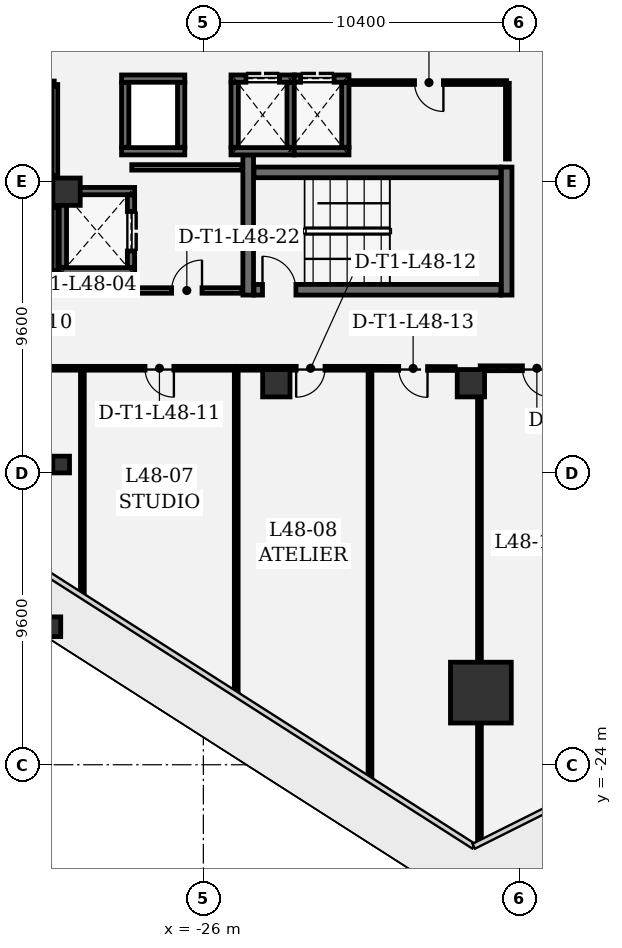
"""IFC4 building model, lengths in metres.
Left out: names, types, materials, properties, quantities, classifications, styles, units other than length and angle.
Written with IfcOpenShell. Run it as: python <this file> out.ifc"""

import sys

from ifc_helpers import new_model, si_unit, direction, frame, frame_2d, origin, origin_2d, place, context, subcontext, project, spatial, rectangle, extrude, element, fill, save


model = new_model("IFC4")
c1 = context("Model", 3, precision=1e-05, world=origin(), true_north=direction((0.0, 1.0)))
c2 = subcontext(c1, "Body", "Model", "MODEL_VIEW")
j1 = project(units=[si_unit("LENGTHUNIT", "METRE"), si_unit("PLANEANGLEUNIT", "RADIAN")], contexts=[c1])
p1 = place(None, origin())
s1 = spatial("IfcSite", under=j1, at=p1, CompositionType="ELEMENT")
p2 = place(p1, origin())
s2 = spatial("IfcBuilding", under=s1, at=p2, CompositionType="ELEMENT")
p3 = place(p2, frame((0.0, 0.0, 209.1)))
s3 = spatial("IfcBuildingStorey", under=s2, at=p3, CompositionType="ELEMENT", Elevation=209.1)
p4 = place(p3, frame((-16.872, -21.627, 0.0), z_axis=(0.0, 0.0, 1.0), x_axis=(1.0, 0.0, 0.0)))
e1 = element("IfcColumn", 1, at=p4, inside=s3, PredefinedType="COLUMN", context=c2, shape_type="SweptSolid", body=[
    extrude(rectangle(XDim=2.0, YDim=2.0, at=origin_2d()), origin(), (0.0, 0.0, 1.0), 4.05),
])
for number, where, z_axis, x_axis in (
    (2, (-17.2, -11.45, 0.0), (0.0, 0.0, 1.0), (1.0, 0.0, 0.0)),
    (3, (-23.6, -11.45, 0.0), (0.0, 0.0, 1.0), (1.0, 0.0, 0.0)),
    (4, (-30.5, -5.15, 0.0), (0.0, 0.0, 1.0), (1.0, 0.0, 0.0)),
):
    element("IfcColumn", number, at=place(p3, frame(where, z_axis=z_axis, x_axis=x_axis)), inside=s3, PredefinedType="COLUMN", context=c2, shape_type="SweptSolid", body=[
        extrude(rectangle(XDim=0.9, YDim=0.9, at=origin_2d()), origin(), (0.0, 0.0, 1.0), 4.05),
    ])
p5 = place(p3, frame((-31.016, -19.46, 0.0), z_axis=(0.0, 0.0, 1.0), x_axis=(1.0, 0.0, 0.0)))
e5 = element("IfcColumn", 5, at=p5, inside=s3, PredefinedType="COLUMN", context=c2, shape_type="SweptSolid", body=[
    extrude(rectangle(XDim=0.65, YDim=0.65, at=origin_2d()), origin(), (0.0, 0.0, 1.0), 4.05),
])
p6 = place(p3, frame((-30.677, -14.124, 0.0), z_axis=(0.0, 0.0, 1.0), x_axis=(1.0, 0.0, 0.0)))
e6 = element("IfcColumn", 6, at=p6, inside=s3, PredefinedType="COLUMN", context=c2, shape_type="SweptSolid", body=[
    extrude(rectangle(XDim=0.55, YDim=0.55, at=origin_2d()), origin(), (0.0, 0.0, 1.0), 4.05),
])
p7 = place(p3, frame((-24.525, -3.94, 0.0), z_axis=(0.0, 0.0, 1.0), x_axis=(0.0, -1.0, 0.0)))
e7 = element("IfcWall", 7, at=p7, inside=s3, PredefinedType="SHEAR", context=c2, shape_type="SweptSolid", body=[
    extrude(rectangle(XDim=4.61, YDim=0.35, at=frame_2d((2.305, 0.0))), origin(), (0.0, 0.0, 1.0), 3.78),
])
p8 = place(p3, frame((-16.025, -8.55, 0.0), z_axis=(0.0, 0.0, 1.0), x_axis=(0.0, 1.0, 0.0)))
e8 = element("IfcWall", 8, at=p8, inside=s3, PredefinedType="SHEAR", context=c2, shape_type="SweptSolid", body=[
    extrude(rectangle(XDim=4.21, YDim=0.35, at=frame_2d((2.105, 0.0))), origin(), (0.0, 0.0, 1.0), 3.78),
])
p9 = place(p3, frame((-24.335, -8.375, 0.0), z_axis=(0.0, 0.0, 1.0), x_axis=(1.0, 0.0, 0.0)))
e9 = element("IfcWall", 9, at=p9, inside=s3, PredefinedType="SHEAR", context=c2, shape_type="SweptSolid", body=[
    extrude(rectangle(XDim=8.12, YDim=0.35, at=frame_2d((4.06, 0.0))), origin(), (0.0, 0.0, 1.0), 3.78),
])
p10 = place(p9, frame((0.28, 0.0, 0.0)))
e10 = element("IfcOpeningElement", 10, at=p10, cuts=e9, PredefinedType="OPENING", context=c2, shape_type="SweptSolid", body=[
    extrude(rectangle(XDim=1.1, YDim=2.2, at=frame_2d((0.55, 1.1))), frame((0.0, 0.185, 0.0), z_axis=(0.0, -1.0, 0.0), x_axis=(1.0, 0.0, 0.0)), (0.0, 0.0, 1.0), 0.37),
])
p11 = place(p3, frame((-16.215, -4.515, 0.0), z_axis=(0.0, 0.0, 1.0), x_axis=(-1.0, 0.0, 0.0)))
e11 = element("IfcWall", 11, at=p11, inside=s3, PredefinedType="SHEAR", context=c2, shape_type="SweptSolid", body=[
    extrude(rectangle(XDim=8.12, YDim=0.35, at=frame_2d((4.06, 0.0))), origin(), (0.0, 0.0, 1.0), 3.78),
])
for number, where, z_axis, x_axis in (
    (12, (-28.26, -7.77, 0.0), (0.0, 0.0, 1.0), (-1.0, 0.0, 0.0)),
    (13, (-30.74, -5.13, 0.0), (0.0, 0.0, 1.0), (1.0, 0.0, 0.0)),
):
    element("IfcWall", number, at=place(p3, frame(where, z_axis=z_axis, x_axis=x_axis)), inside=s3, PredefinedType="SHEAR", context=c2, shape_type="SweptSolid", body=[
        extrude(rectangle(XDim=2.48, YDim=0.24, at=frame_2d((1.24, 0.0))), origin(), (0.0, 0.0, 1.0), 3.78),
    ])
p12 = place(p3, frame((-30.62, -7.638, 0.0), z_axis=(0.0, 0.0, 1.0), x_axis=(0.0, 1.0, 0.0)))
e14 = element("IfcWall", 14, at=p12, inside=s3, PredefinedType="SHEAR", context=c2, shape_type="SweptSolid", body=[
    extrude(rectangle(XDim=2.376, YDim=0.24, at=frame_2d((1.188, 0.0))), origin(), (0.0, 0.0, 1.0), 3.78),
])
p13 = place(p3, frame((-28.38, -5.262, 0.0), z_axis=(0.0, 0.0, 1.0), x_axis=(0.0, -1.0, 0.0)))
e15 = element("IfcWall", 15, at=p13, inside=s3, PredefinedType="SHEAR", context=c2, shape_type="SweptSolid", body=[
    extrude(rectangle(XDim=2.376, YDim=0.24, at=frame_2d((1.188, 0.0))), origin(), (0.0, 0.0, 1.0), 3.78),
])
p14 = place(p13, frame((0.538, 0.0, 0.0)))
e16 = element("IfcOpeningElement", 16, at=p14, cuts=e15, PredefinedType="OPENING", context=c2, shape_type="SweptSolid", body=[
    extrude(rectangle(XDim=1.3, YDim=2.3, at=frame_2d((0.65, 1.15))), frame((0.0, 0.13, 0.0), z_axis=(0.0, -1.0, 0.0), x_axis=(1.0, 0.0, 0.0)), (0.0, 0.0, 1.0), 0.26),
])
for number, where, z_axis, x_axis in (
    (17, (-26.61, -3.82, 0.0), (0.0, 0.0, 1.0), (-1.0, 0.0, 0.0)),
    (18, (-28.69, -1.43, 0.0), (0.0, 0.0, 1.0), (1.0, 0.0, 0.0)),
):
    element("IfcWall", number, at=place(p3, frame(where, z_axis=z_axis, x_axis=x_axis)), inside=s3, PredefinedType="SHEAR", context=c2, shape_type="SweptSolid", body=[
        extrude(rectangle(XDim=2.08, YDim=0.24, at=frame_2d((1.04, 0.0))), origin(), (0.0, 0.0, 1.0), 3.78),
    ])
for number, where, z_axis, x_axis in (
    (19, (-28.57, -3.688, 0.0), (0.0, 0.0, 1.0), (0.0, 1.0, 0.0)),
    (20, (-26.73, -1.562, 0.0), (0.0, 0.0, 1.0), (0.0, -1.0, 0.0)),
):
    element("IfcWall", number, at=place(p3, frame(where, z_axis=z_axis, x_axis=x_axis)), inside=s3, PredefinedType="SHEAR", context=c2, shape_type="SweptSolid", body=[
        extrude(rectangle(XDim=2.126, YDim=0.24, at=frame_2d((1.063, 0.0))), origin(), (0.0, 0.0, 1.0), 3.78),
    ])
p15 = place(p3, frame((-23.01, -3.82, 0.0), z_axis=(0.0, 0.0, 1.0), x_axis=(-1.0, 0.0, 0.0)))
e21 = element("IfcWall", 21, at=p15, inside=s3, PredefinedType="SHEAR", context=c2, shape_type="SweptSolid", body=[
    extrude(rectangle(XDim=2.08, YDim=0.24, at=frame_2d((1.04, 0.0))), origin(), (0.0, 0.0, 1.0), 3.78),
])
p16 = place(p3, frame((-25.09, -1.43, 0.0), z_axis=(0.0, 0.0, 1.0), x_axis=(1.0, 0.0, 0.0)))
e22 = element("IfcWall", 22, at=p16, inside=s3, PredefinedType="SHEAR", context=c2, shape_type="SweptSolid", body=[
    extrude(rectangle(XDim=2.08, YDim=0.24, at=frame_2d((1.04, 0.0))), origin(), (0.0, 0.0, 1.0), 3.78),
])
p17 = place(p16, frame((0.49, 0.0, 0.0)))
e23 = element("IfcOpeningElement", 23, at=p17, cuts=e22, PredefinedType="OPENING", context=c2, shape_type="SweptSolid", body=[
    extrude(rectangle(XDim=1.1, YDim=2.2, at=frame_2d((0.55, 1.1))), frame((0.0, 0.13, 0.0), z_axis=(0.0, -1.0, 0.0), x_axis=(1.0, 0.0, 0.0)), (0.0, 0.0, 1.0), 0.26),
])
for number, where, z_axis, x_axis in (
    (24, (-24.97, -3.688, 0.0), (0.0, 0.0, 1.0), (0.0, 1.0, 0.0)),
    (25, (-23.13, -1.562, 0.0), (0.0, 0.0, 1.0), (0.0, -1.0, 0.0)),
):
    element("IfcWall", number, at=place(p3, frame(where, z_axis=z_axis, x_axis=x_axis)), inside=s3, PredefinedType="SHEAR", context=c2, shape_type="SweptSolid", body=[
        extrude(rectangle(XDim=2.126, YDim=0.24, at=frame_2d((1.063, 0.0))), origin(), (0.0, 0.0, 1.0), 3.78),
    ])
p18 = place(p3, frame((-21.21, -3.82, 0.0), z_axis=(0.0, 0.0, 1.0), x_axis=(-1.0, 0.0, 0.0)))
e26 = element("IfcWall", 26, at=p18, inside=s3, PredefinedType="SHEAR", context=c2, shape_type="SweptSolid", body=[
    extrude(rectangle(XDim=1.8, YDim=0.24, at=frame_2d((0.9, 0.0))), origin(), (0.0, 0.0, 1.0), 3.78),
])
p19 = place(p3, frame((-23.01, -1.43, 0.0), z_axis=(0.0, 0.0, 1.0), x_axis=(1.0, 0.0, 0.0)))
e27 = element("IfcWall", 27, at=p19, inside=s3, PredefinedType="SHEAR", context=c2, shape_type="SweptSolid", body=[
    extrude(rectangle(XDim=1.8, YDim=0.24, at=frame_2d((0.9, 0.0))), origin(), (0.0, 0.0, 1.0), 3.78),
])
p20 = place(p19, frame((0.21, 0.0, 0.0)))
e28 = element("IfcOpeningElement", 28, at=p20, cuts=e27, PredefinedType="OPENING", context=c2, shape_type="SweptSolid", body=[
    extrude(rectangle(XDim=1.1, YDim=2.2, at=frame_2d((0.55, 1.1))), frame((0.0, 0.13, 0.0), z_axis=(0.0, -1.0, 0.0), x_axis=(1.0, 0.0, 0.0)), (0.0, 0.0, 1.0), 0.26),
])
p21 = place(p3, frame((-21.33, -1.562, 0.0), z_axis=(0.0, 0.0, 1.0), x_axis=(0.0, -1.0, 0.0)))
e29 = element("IfcWall", 29, at=p21, inside=s3, PredefinedType="SHEAR", context=c2, shape_type="SweptSolid", body=[
    extrude(rectangle(XDim=2.126, YDim=0.24, at=frame_2d((1.063, 0.0))), origin(), (0.0, 0.0, 1.0), 3.78),
])
p22 = place(p3, frame((-28.355, -8.4, 0.0), z_axis=(0.0, 0.0, 1.0), x_axis=(1.0, 0.0, 0.0)))
e30 = element("IfcWall", 30, at=p22, inside=s3, PredefinedType="PARTITIONING", context=c2, shape_type="SweptSolid", body=[
    extrude(rectangle(XDim=3.622, YDim=0.18, at=frame_2d((1.811, 0.0))), origin(), (0.0, 0.0, 1.0), 3.78),
])
p23 = place(p22, frame((1.311, 0.0, 0.0)))
e31 = element("IfcOpeningElement", 31, at=p23, cuts=e30, PredefinedType="OPENING", context=c2, shape_type="SweptSolid", body=[
    extrude(rectangle(XDim=1.0, YDim=2.15, at=frame_2d((0.5, 1.075))), frame((0.0, 0.1, 0.0), z_axis=(0.0, -1.0, 0.0), x_axis=(1.0, 0.0, 0.0)), (0.0, 0.0, 1.0), 0.2),
])
p24 = place(p3, frame((-24.733, -4.35, 0.0), z_axis=(0.0, 0.0, 1.0), x_axis=(-1.0, 0.0, 0.0)))
e32 = element("IfcWall", 32, at=p24, inside=s3, PredefinedType="PARTITIONING", context=c2, shape_type="SweptSolid", body=[
    extrude(rectangle(XDim=3.622, YDim=0.18, at=frame_2d((1.811, 0.0))), origin(), (0.0, 0.0, 1.0), 3.78),
])
p25 = place(p3, frame((-16.0, -4.075, 0.0), z_axis=(0.0, 0.0, 1.0), x_axis=(0.0, 1.0, 0.0)))
e33 = element("IfcWall", 33, at=p25, inside=s3, PredefinedType="PARTITIONING", context=c2, shape_type="SweptSolid", body=[
    extrude(rectangle(XDim=2.49, YDim=0.125, at=frame_2d((1.245, 0.0))), origin(), (0.0, 0.0, 1.0), 3.78),
])
p26 = place(p3, frame((-16.025, -1.56, 0.0), z_axis=(0.0, 0.0, 1.0), x_axis=(-1.0, 0.0, 0.0)))
e34 = element("IfcWall", 34, at=p26, inside=s3, PredefinedType="PARTITIONING", context=c2, shape_type="SweptSolid", body=[
    extrude(rectangle(XDim=5.109, YDim=0.125, at=frame_2d((2.554, 0.0))), origin(), (0.0, 0.0, 1.0), 3.78),
])
p27 = place(p26, frame((2.079, 0.0, 0.0)))
e35 = element("IfcOpeningElement", 35, at=p27, cuts=e34, PredefinedType="OPENING", context=c2, shape_type="SweptSolid", body=[
    extrude(rectangle(XDim=0.95, YDim=2.15, at=frame_2d((0.475, 1.075))), frame((0.0, 0.073, 0.0), z_axis=(0.0, -1.0, 0.0), x_axis=(1.0, 0.0, 0.0)), (0.0, 0.0, 1.0), 0.145),
])
p28 = place(p3, frame((-34.155, -8.35, 0.0), z_axis=(0.0, 0.0, 1.0), x_axis=(1.0, 0.0, 0.0)))
e36 = element("IfcWall", 36, at=p28, inside=s3, PredefinedType="PARTITIONING", context=c2, shape_type="SweptSolid", body=[
    extrude(rectangle(XDim=3.25, YDim=0.18, at=frame_2d((1.625, 0.0))), origin(), (0.0, 0.0, 1.0), 3.344),
])
p29 = place(p3, frame((-30.88, -7.743, 0.0), z_axis=(0.0, 0.0, 1.0), x_axis=(0.0, 1.0, 0.0)))
e37 = element("IfcWall", 37, at=p29, inside=s3, PredefinedType="PARTITIONING", context=c2, shape_type="SweptSolid", body=[
    extrude(rectangle(XDim=2.078, YDim=0.18, at=frame_2d((1.039, 0.0))), origin(), (0.0, 0.0, 1.0), 3.78),
])
p30 = place(p3, frame((-30.88, -4.635, 0.0), z_axis=(0.0, 0.0, 1.0), x_axis=(0.0, 1.0, 0.0)))
e38 = element("IfcWall", 38, at=p30, inside=s3, PredefinedType="PARTITIONING", context=c2, shape_type="SweptSolid", body=[
    extrude(rectangle(XDim=3.01, YDim=0.18, at=frame_2d((1.505, 0.0))), origin(), (0.0, 0.0, 1.0), 3.78),
])
p31 = place(p3, frame((-30.905, -1.6, 0.0), z_axis=(0.0, 0.0, 1.0), x_axis=(-1.0, 0.0, 0.0)))
e39 = element("IfcWall", 39, at=p31, inside=s3, PredefinedType="PARTITIONING", context=c2, shape_type="SweptSolid", body=[
    extrude(rectangle(XDim=3.25, YDim=0.18, at=frame_2d((1.625, 0.0))), origin(), (0.0, 0.0, 1.0), 3.78),
])
p32 = place(p3, frame((-30.004, -10.958, 0.0), z_axis=(0.0, 0.0, 1.0), x_axis=(-1.0, 0.0, 0.0)))
e40 = element("IfcWall", 40, at=p32, inside=s3, PredefinedType="PARTITIONING", context=c2, shape_type="SweptSolid", body=[
    extrude(rectangle(XDim=4.621, YDim=0.125, at=frame_2d((2.311, 0.0))), origin(), (0.0, 0.0, 1.0), 2.9),
])
p33 = place(p32, frame((1.835, 0.0, 0.0)))
e41 = element("IfcOpeningElement", 41, at=p33, cuts=e40, PredefinedType="OPENING", context=c2, shape_type="SweptSolid", body=[
    extrude(rectangle(XDim=0.95, YDim=2.15, at=frame_2d((0.475, 1.075))), frame((0.0, 0.073, 0.0), z_axis=(0.0, -1.0, 0.0), x_axis=(1.0, 0.0, 0.0)), (0.0, 0.0, 1.0), 0.145),
])
p34 = place(p3, frame((-29.979, -18.373, 0.0), z_axis=(0.0, 0.0, 1.0), x_axis=(0.0, 1.0, 0.0)))
e42 = element("IfcWall", 42, at=p34, inside=s3, PredefinedType="PARTITIONING", context=c2, shape_type="SweptSolid", body=[
    extrude(rectangle(XDim=7.39, YDim=0.125, at=frame_2d((3.695, 0.0))), origin(), (0.0, 0.0, 1.0), 3.78),
])
p35 = place(p3, frame((-24.943, -10.958, 0.0), z_axis=(0.0, 0.0, 1.0), x_axis=(-1.0, 0.0, 0.0)))
e43 = element("IfcWall", 43, at=p35, inside=s3, PredefinedType="PARTITIONING", context=c2, shape_type="SweptSolid", body=[
    extrude(rectangle(XDim=5.003, YDim=0.125, at=frame_2d((2.501, 0.0))), origin(), (0.0, 0.0, 1.0), 3.78),
])
p36 = place(p35, frame((2.026, 0.0, 0.0)))
e44 = element("IfcOpeningElement", 44, at=p36, cuts=e43, PredefinedType="OPENING", context=c2, shape_type="SweptSolid", body=[
    extrude(rectangle(XDim=0.95, YDim=2.15, at=frame_2d((0.475, 1.075))), frame((0.0, 0.073, 0.0), z_axis=(0.0, -1.0, 0.0), x_axis=(1.0, 0.0, 0.0)), (0.0, 0.0, 1.0), 0.145),
])
p37 = place(p3, frame((-24.918, -21.607, 0.0), z_axis=(0.0, 0.0, 1.0), x_axis=(0.0, 1.0, 0.0)))
e45 = element("IfcWall", 45, at=p37, inside=s3, PredefinedType="PARTITIONING", context=c2, shape_type="SweptSolid", body=[
    extrude(rectangle(XDim=10.625, YDim=0.125, at=frame_2d((5.312, 0.0))), origin(), (0.0, 0.0, 1.0), 3.344),
])
p38 = place(p3, frame((-20.544, -10.958, 0.0), z_axis=(0.0, 0.0, 1.0), x_axis=(-1.0, 0.0, 0.0)))
e46 = element("IfcWall", 46, at=p38, inside=s3, PredefinedType="PARTITIONING", context=c2, shape_type="SweptSolid", body=[
    extrude(rectangle(XDim=4.341, YDim=0.125, at=frame_2d((2.17, 0.0))), origin(), (0.0, 0.0, 1.0), 3.78),
])
p39 = place(p38, frame((1.453, 0.0, 0.0)))
e47 = element("IfcOpeningElement", 47, at=p39, cuts=e46, PredefinedType="OPENING", context=c2, shape_type="SweptSolid", body=[
    extrude(rectangle(XDim=0.95, YDim=2.15, at=frame_2d((0.475, 1.075))), frame((0.0, 0.073, 0.0), z_axis=(0.0, -1.0, 0.0), x_axis=(1.0, 0.0, 0.0)), (0.0, 0.0, 1.0), 0.145),
])
p40 = place(p3, frame((-20.519, -24.419, 0.0), z_axis=(0.0, 0.0, 1.0), x_axis=(0.0, 1.0, 0.0)))
e48 = element("IfcWall", 48, at=p40, inside=s3, PredefinedType="PARTITIONING", context=c2, shape_type="SweptSolid", body=[
    extrude(rectangle(XDim=13.436, YDim=0.125, at=frame_2d((6.718, 0.0))), origin(), (0.0, 0.0, 1.0), 2.895),
])
p41 = place(p3, frame((-16.919, -26.506, 0.0), z_axis=(0.0, 0.0, 1.0), x_axis=(0.0, 1.0, 0.0)))
e49 = element("IfcWall", 49, at=p41, inside=s3, PredefinedType="PARTITIONING", context=c2, shape_type="SweptSolid", body=[
    extrude(rectangle(XDim=3.814, YDim=0.125, at=frame_2d((1.907, 0.0))), origin(), (0.0, 0.0, 1.0), 3.78),
])
p42 = place(p3, frame((-16.919, -20.562, 0.0), z_axis=(0.0, 0.0, 1.0), x_axis=(0.0, 1.0, 0.0)))
e50 = element("IfcWall", 50, at=p42, inside=s3, PredefinedType="PARTITIONING", context=c2, shape_type="SweptSolid", body=[
    extrude(rectangle(XDim=8.597, YDim=0.125, at=frame_2d((4.298, 0.0))), origin(), (0.0, 0.0, 1.0), 2.9),
])
p43 = place(p3, frame((-17.715, -10.967, 0.0), z_axis=(0.0, 0.0, 1.0), x_axis=(-0.999994395436, 0.003347998857, 0.0)))
e51 = element("IfcWall", 51, at=p43, inside=s3, PredefinedType="PARTITIONING", context=c2, shape_type="SweptSolid", body=[
    extrude(rectangle(XDim=2.771, YDim=0.125, at=frame_2d((1.385, 0.0))), origin(), (0.0, 0.0, 1.0), 3.344),
])
p44 = place(p43, frame((0.91, 0.0, 0.0)))
e52 = element("IfcOpeningElement", 52, at=p44, cuts=e51, PredefinedType="OPENING", context=c2, shape_type="SweptSolid", body=[
    extrude(rectangle(XDim=0.95, YDim=2.15, at=frame_2d((0.475, 1.075))), frame((0.0, 0.073, 0.0), z_axis=(0.0, -1.0, 0.0), x_axis=(1.0, 0.0, 0.0)), (0.0, 0.0, 1.0), 0.145),
])
p45 = place(p3, frame((-13.167, -10.958, 0.0), z_axis=(0.0, 0.0, 1.0), x_axis=(-1.0, 0.0, 0.0)))
e53 = element("IfcWall", 53, at=p45, inside=s3, PredefinedType="PARTITIONING", context=c2, shape_type="SweptSolid", body=[
    extrude(rectangle(XDim=3.727, YDim=0.16, at=frame_2d((1.863, 0.0))), origin(), (0.0, 0.0, 1.0), 3.344),
])
p46 = place(p45, frame((1.388, 0.0, 0.0)))
e54 = element("IfcOpeningElement", 54, at=p46, cuts=e53, PredefinedType="OPENING", context=c2, shape_type="SweptSolid", body=[
    extrude(rectangle(XDim=0.95, YDim=2.15, at=frame_2d((0.475, 1.075))), frame((0.0, 0.09, 0.0), z_axis=(0.0, -1.0, 0.0), x_axis=(1.0, 0.0, 0.0)), (0.0, 0.0, 1.0), 0.18),
])
p47 = place(p10, origin())
e55 = element("IfcDoor", 55, at=p47, inside=s3, OperationType="SINGLE_SWING_LEFT", PredefinedType="DOOR", context=c2, shape_type="SweptSolid", body=[
    extrude(rectangle(XDim=1.1, YDim=2.2, at=frame_2d((0.55, 1.1))), frame((0.0, 0.025, 0.0), z_axis=(0.0, -1.0, 0.0), x_axis=(1.0, 0.0, 0.0)), (0.0, 0.0, 1.0), 0.05),
])
fill(e10, e55)
p48 = place(p14, origin())
e56 = element("IfcDoor", 56, at=p48, inside=s3, OperationType="DOUBLE_DOOR_SLIDING", PredefinedType="DOOR", context=c2, shape_type="SweptSolid", body=[
    extrude(rectangle(XDim=1.3, YDim=2.3, at=frame_2d((0.65, 1.15))), frame((0.0, 0.025, 0.0), z_axis=(0.0, -1.0, 0.0), x_axis=(1.0, 0.0, 0.0)), (0.0, 0.0, 1.0), 0.05),
])
fill(e16, e56)
p49 = place(p17, origin())
e57 = element("IfcDoor", 57, at=p49, inside=s3, OperationType="DOUBLE_DOOR_SLIDING", PredefinedType="DOOR", context=c2, shape_type="SweptSolid", body=[
    extrude(rectangle(XDim=1.1, YDim=2.2, at=frame_2d((0.55, 1.1))), frame((0.0, 0.025, 0.0), z_axis=(0.0, -1.0, 0.0), x_axis=(1.0, 0.0, 0.0)), (0.0, 0.0, 1.0), 0.05),
])
fill(e23, e57)
p50 = place(p20, origin())
e58 = element("IfcDoor", 58, at=p50, inside=s3, OperationType="DOUBLE_DOOR_SLIDING", PredefinedType="DOOR", context=c2, shape_type="SweptSolid", body=[
    extrude(rectangle(XDim=1.1, YDim=2.2, at=frame_2d((0.55, 1.1))), frame((0.0, 0.025, 0.0), z_axis=(0.0, -1.0, 0.0), x_axis=(1.0, 0.0, 0.0)), (0.0, 0.0, 1.0), 0.05),
])
fill(e28, e58)
p51 = place(p27, origin())
e59 = element("IfcDoor", 59, at=p51, inside=s3, OperationType="SINGLE_SWING_LEFT", PredefinedType="DOOR", context=c2, shape_type="SweptSolid", body=[
    extrude(rectangle(XDim=0.95, YDim=2.15, at=frame_2d((0.475, 1.075))), frame((0.0, 0.025, 0.0), z_axis=(0.0, -1.0, 0.0), x_axis=(1.0, 0.0, 0.0)), (0.0, 0.0, 1.0), 0.05),
])
fill(e35, e59)
p52 = place(p36, origin())
e60 = element("IfcDoor", 60, at=p52, inside=s3, OperationType="SINGLE_SWING_LEFT", PredefinedType="DOOR", context=c2, shape_type="SweptSolid", body=[
    extrude(rectangle(XDim=0.95, YDim=2.15, at=frame_2d((0.475, 1.075))), frame((0.0, 0.025, 0.0), z_axis=(0.0, -1.0, 0.0), x_axis=(1.0, 0.0, 0.0)), (0.0, 0.0, 1.0), 0.05),
])
fill(e44, e60)
p53 = place(p39, origin())
e61 = element("IfcDoor", 61, at=p53, inside=s3, OperationType="SINGLE_SWING_RIGHT", PredefinedType="DOOR", context=c2, shape_type="SweptSolid", body=[
    extrude(rectangle(XDim=0.95, YDim=2.15, at=frame_2d((0.475, 1.075))), frame((0.0, 0.025, 0.0), z_axis=(0.0, -1.0, 0.0), x_axis=(1.0, 0.0, 0.0)), (0.0, 0.0, 1.0), 0.05),
])
fill(e47, e61)
p54 = place(p44, origin())
e62 = element("IfcDoor", 62, at=p54, inside=s3, OperationType="SINGLE_SWING_LEFT", PredefinedType="DOOR", context=c2, shape_type="SweptSolid", body=[
    extrude(rectangle(XDim=0.95, YDim=2.15, at=frame_2d((0.475, 1.075))), frame((0.0, 0.025, 0.0), z_axis=(0.0, -1.0, 0.0), x_axis=(1.0, 0.0, 0.0)), (0.0, 0.0, 1.0), 0.05),
])
fill(e52, e62)
p55 = place(p23, origin())
e63 = element("IfcDoor", 63, at=p55, inside=s3, OperationType="SINGLE_SWING_RIGHT", PredefinedType="DOOR", context=c2, shape_type="SweptSolid", body=[
    extrude(rectangle(XDim=1.0, YDim=2.15, at=frame_2d((0.5, 1.075))), frame((0.0, 0.025, 0.0), z_axis=(0.0, -1.0, 0.0), x_axis=(1.0, 0.0, 0.0)), (0.0, 0.0, 1.0), 0.05),
])
fill(e31, e63)
p56 = place(p46, origin())
e64 = element("IfcDoor", 64, at=p56, inside=s3, OperationType="SINGLE_SWING_LEFT", PredefinedType="DOOR", context=c2, shape_type="SweptSolid", body=[
    extrude(rectangle(XDim=0.95, YDim=2.15, at=frame_2d((0.475, 1.075))), frame((0.0, 0.025, 0.0), z_axis=(0.0, -1.0, 0.0), x_axis=(1.0, 0.0, 0.0)), (0.0, 0.0, 1.0), 0.05),
])
fill(e54, e64)
save(model, sys.argv[1])
